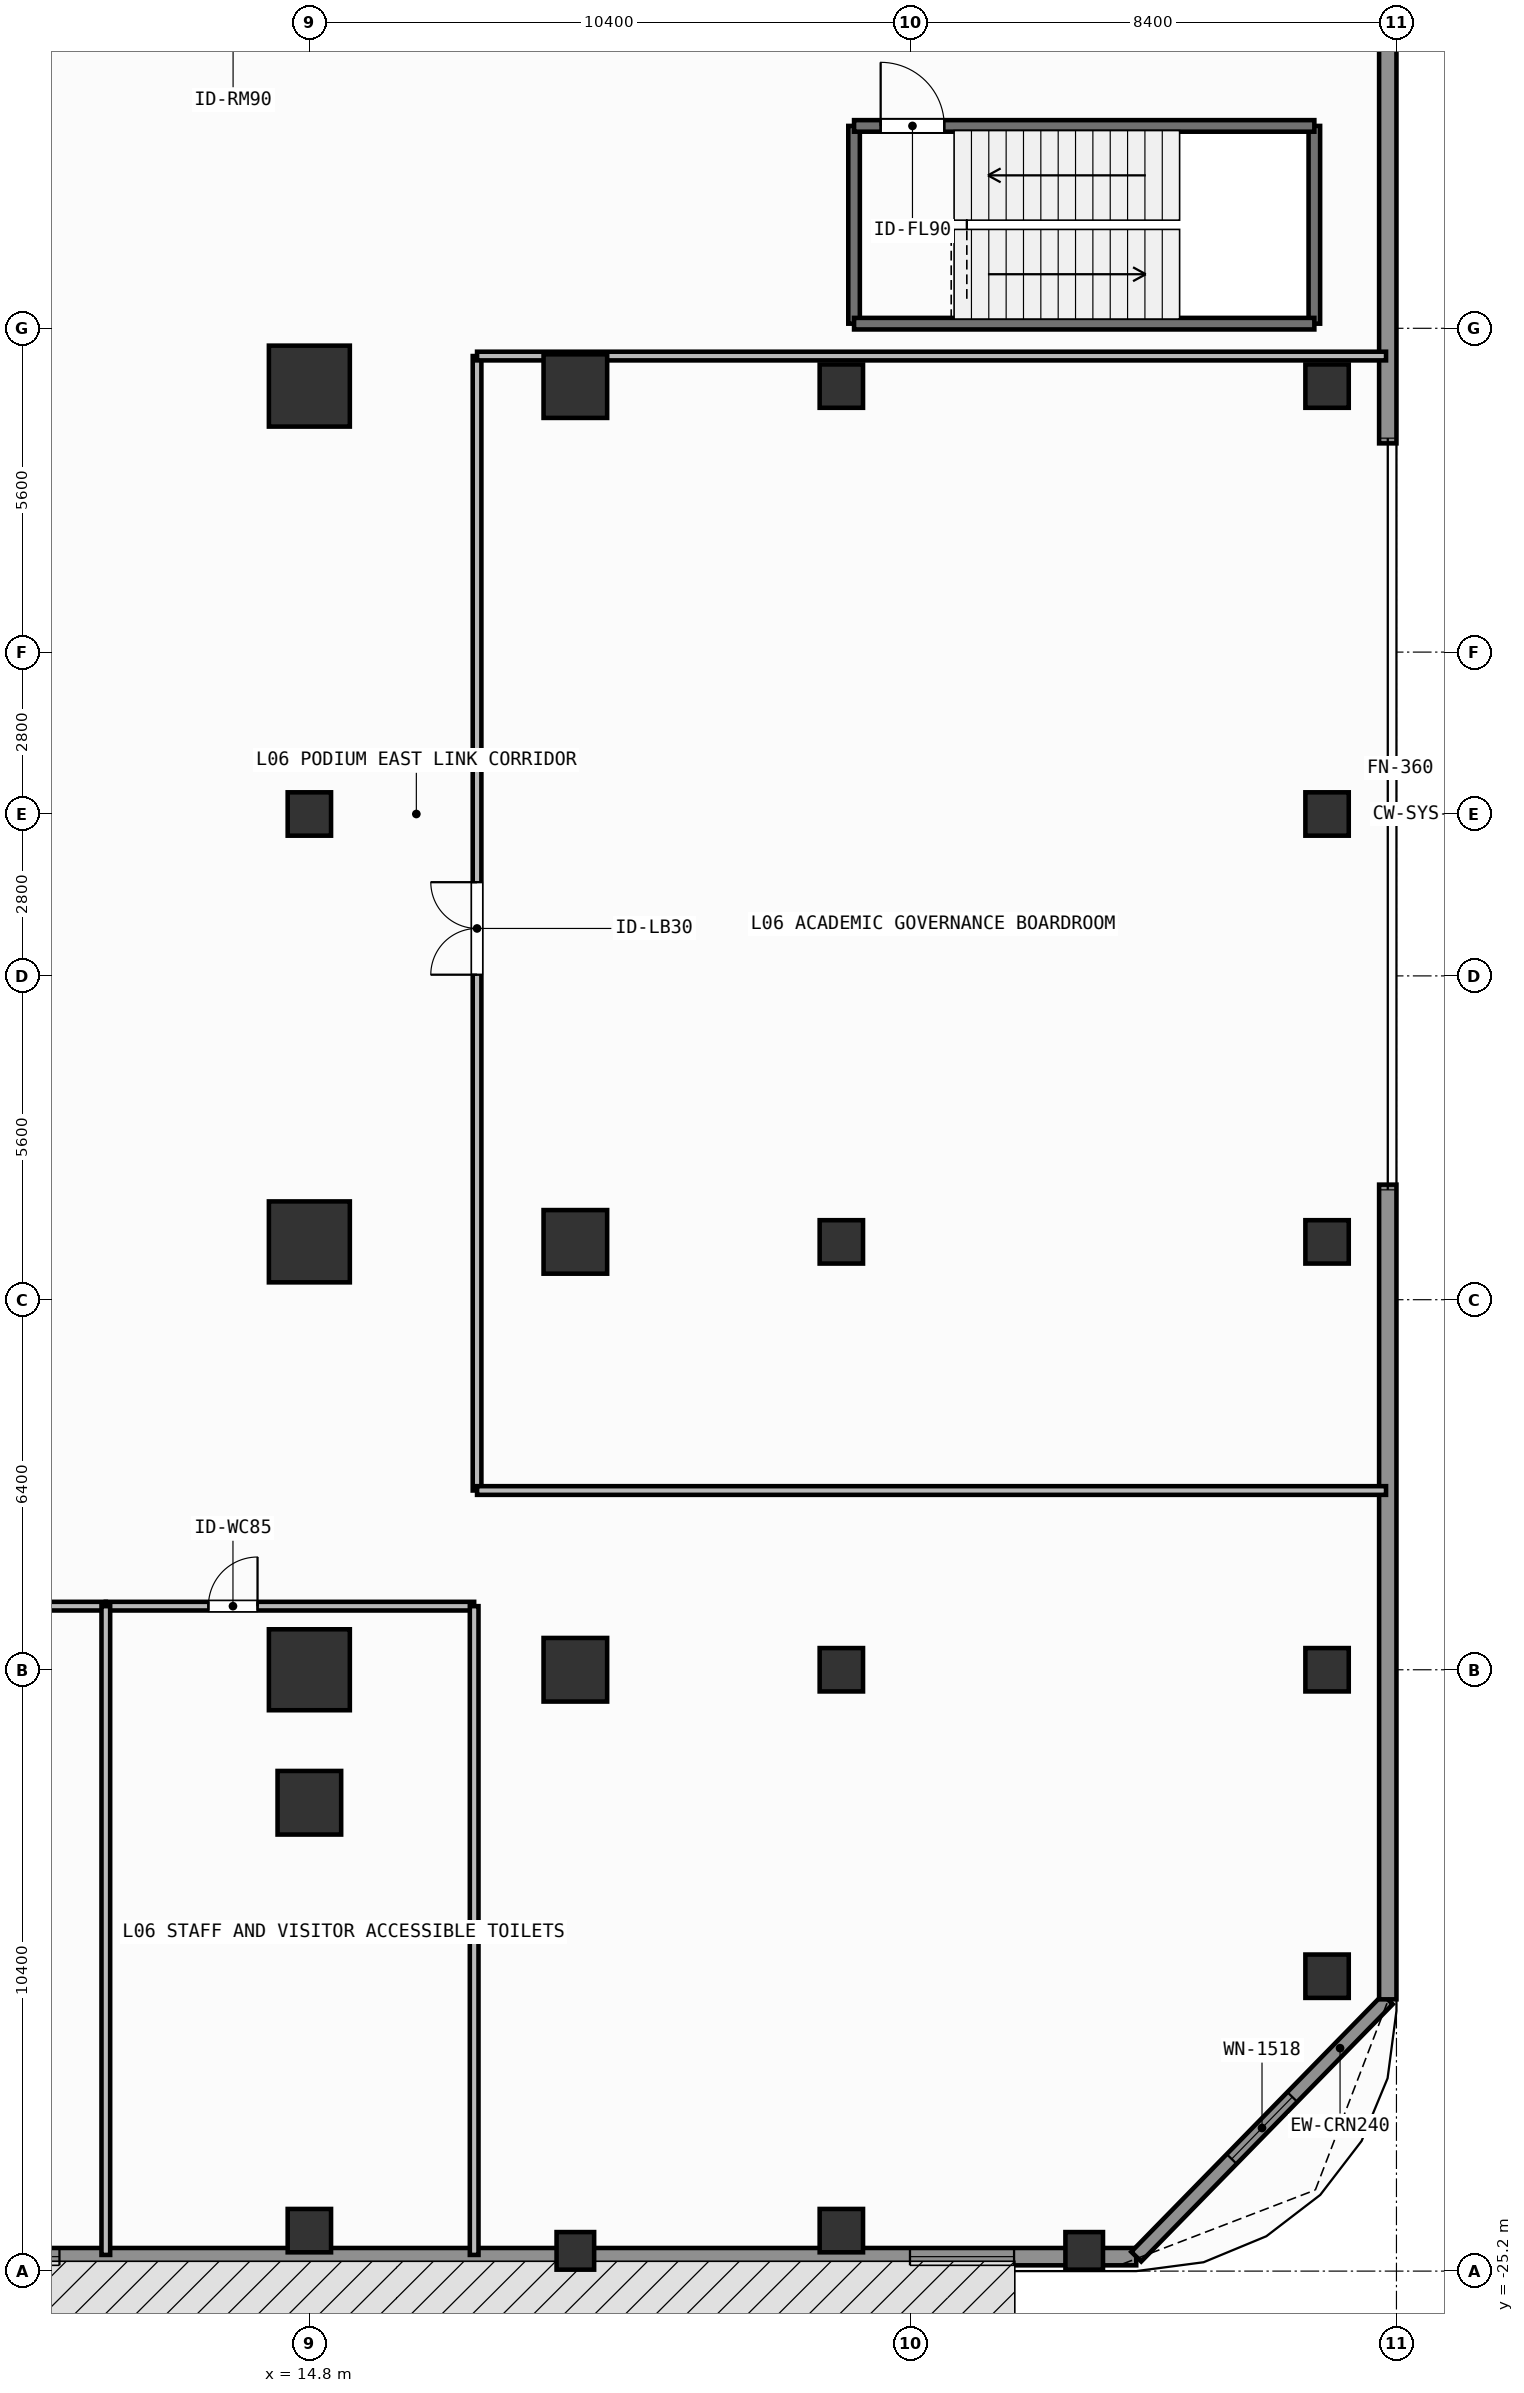
"""IFC4 building model, lengths in metres.
Left out: names, types, materials, properties, quantities, classifications, styles, units other than length and angle.
Written with IfcOpenShell. Run it as: python <this file> out.ifc"""

import sys

from ifc_helpers import new_model, si_unit, direction, frame, frame_2d, origin, origin_2d, place, context, subcontext, project, spatial, rectangle, extrude, element, fill, save


model = new_model("IFC4")
c1 = context("Model", 3, precision=1e-05, world=origin(), true_north=direction((0.0, 1.0)))
c2 = subcontext(c1, "Body", "Model", "MODEL_VIEW")
j1 = project(units=[si_unit("LENGTHUNIT", "METRE"), si_unit("PLANEANGLEUNIT", "RADIAN")], contexts=[c1])
p1 = place(None, origin())
s1 = spatial("IfcSite", under=j1, at=p1, CompositionType="ELEMENT")
p2 = place(p1, origin())
s2 = spatial("IfcBuilding", under=s1, at=p2, CompositionType="ELEMENT")
p3 = place(p2, frame((0.0, 0.0, 21.6)))
s3 = spatial("IfcBuildingStorey", under=s2, at=p3, CompositionType="ELEMENT", Elevation=21.6)
for number, where, z_axis, x_axis in (
    (1, (14.8, -14.8, 0.0), (0.0, 0.0, 1.0), (1.0, 0.0, 0.0)),
    (2, (14.8, -7.4, 0.0), (0.0, 0.0, 1.0), (1.0, 0.0, 0.0)),
    (3, (14.8, 7.4, 0.0), (0.0, 0.0, 1.0), (1.0, 0.0, 0.0)),
):
    element("IfcColumn", number, at=place(p3, frame(where, z_axis=z_axis, x_axis=x_axis)), inside=s3, PredefinedType="COLUMN", context=c2, shape_type="SweptSolid", body=[
        extrude(rectangle(XDim=1.4, YDim=1.4, at=origin_2d()), origin(), (0.0, 0.0, 1.0), 4.8),
    ])
for number, where, z_axis, x_axis in (
    (4, (19.4, -14.8, 0.0), (0.0, 0.0, 1.0), (1.0, 0.0, 0.0)),
    (5, (19.4, -7.4, 0.0), (0.0, 0.0, 1.0), (1.0, 0.0, 0.0)),
    (6, (19.4, 7.4, 0.0), (0.0, 0.0, 1.0), (1.0, 0.0, 0.0)),
    (7, (14.8, -17.1, 0.0), (0.0, 0.0, 1.0), (1.0, 0.0, 0.0)),
):
    element("IfcColumn", number, at=place(p3, frame(where, z_axis=z_axis, x_axis=x_axis)), inside=s3, PredefinedType="COLUMN", context=c2, shape_type="SweptSolid", body=[
        extrude(rectangle(XDim=1.1, YDim=1.1, at=origin_2d()), origin(), (0.0, 0.0, 1.0), 4.8),
    ])
for number, where, z_axis, x_axis in (
    (8, (14.8, -24.5, 0.0), (0.0, 0.0, 1.0), (1.0, 0.0, 0.0)),
    (9, (14.8, 0.0, 0.0), (0.0, 0.0, 1.0), (1.0, 0.0, 0.0)),
    (10, (24.0, -24.5, 0.0), (0.0, 0.0, 1.0), (1.0, 0.0, 0.0)),
    (11, (24.0, -14.8, 0.0), (0.0, 0.0, 1.0), (1.0, 0.0, 0.0)),
    (12, (24.0, -7.4, 0.0), (0.0, 0.0, 1.0), (1.0, 0.0, 0.0)),
    (13, (24.0, 7.4, 0.0), (0.0, 0.0, 1.0), (1.0, 0.0, 0.0)),
    (14, (32.4, -14.8, 0.0), (0.0, 0.0, 1.0), (1.0, 0.0, 0.0)),
    (15, (32.4, -7.4, 0.0), (0.0, 0.0, 1.0), (1.0, 0.0, 0.0)),
    (16, (32.4, 0.0, 0.0), (0.0, 0.0, 1.0), (1.0, 0.0, 0.0)),
    (17, (32.4, 7.4, 0.0), (0.0, 0.0, 1.0), (1.0, 0.0, 0.0)),
    (18, (32.4, -20.1, 0.0), (0.0, 0.0, 1.0), (1.0, 0.0, 0.0)),
):
    element("IfcColumn", number, at=place(p3, frame(where, z_axis=z_axis, x_axis=x_axis)), inside=s3, PredefinedType="COLUMN", context=c2, shape_type="SweptSolid", body=[
        extrude(rectangle(XDim=0.75, YDim=0.75, at=origin_2d()), origin(), (0.0, 0.0, 1.0), 4.8),
    ])
for number, where, z_axis, x_axis in (
    (19, (19.4, -24.85, 0.0), (0.0, 0.0, 1.0), (1.0, 0.0, 0.0)),
    (20, (28.2, -24.85, 0.0), (0.0, 0.0, 1.0), (1.0, 0.0, 0.0)),
):
    element("IfcColumn", number, at=place(p3, frame(where, z_axis=z_axis, x_axis=x_axis)), inside=s3, PredefinedType="PILASTER", context=c2, shape_type="SweptSolid", body=[
        extrude(rectangle(XDim=0.65, YDim=0.65, at=origin_2d()), origin(), (0.0, 0.0, 1.0), 4.8),
    ])
p4 = place(p3, frame((29.1, -24.95, 0.0), z_axis=(0.0, 0.0, 1.0), x_axis=(-1.0, 0.0, 0.0)))
e21 = element("IfcWall", 21, at=p4, inside=s3, PredefinedType="SOLIDWALL", context=c2, shape_type="SweptSolid", body=[
    extrude(rectangle(XDim=58.2, YDim=0.3, at=frame_2d((29.1, 0.0))), origin(), (0.0, 0.0, 1.0), 4.48),
])
p5 = place(p4, frame((54.287, 0.0, 0.85)))
e22 = element("IfcOpeningElement", 22, at=p5, cuts=e21, PredefinedType="OPENING", context=c2, shape_type="SweptSolid", body=[
    extrude(rectangle(XDim=1.8, YDim=2.0, at=frame_2d((0.9, 1.0))), frame((0.0, 0.16, 0.0), z_axis=(0.0, -1.0, 0.0), x_axis=(1.0, 0.0, 0.0)), (0.0, 0.0, 1.0), 0.32),
])
p6 = place(p4, frame((49.875, 0.0, 0.85)))
e23 = element("IfcOpeningElement", 23, at=p6, cuts=e21, PredefinedType="OPENING", context=c2, shape_type="SweptSolid", body=[
    extrude(rectangle(XDim=1.8, YDim=2.0, at=frame_2d((0.9, 1.0))), frame((0.0, 0.16, 0.0), z_axis=(0.0, -1.0, 0.0), x_axis=(1.0, 0.0, 0.0)), (0.0, 0.0, 1.0), 0.32),
])
p7 = place(p4, frame((39.3, 0.0, 0.85)))
e24 = element("IfcOpeningElement", 24, at=p7, cuts=e21, PredefinedType="OPENING", context=c2, shape_type="SweptSolid", body=[
    extrude(rectangle(XDim=1.8, YDim=2.0, at=frame_2d((0.9, 1.0))), frame((0.0, 0.16, 0.0), z_axis=(0.0, -1.0, 0.0), x_axis=(1.0, 0.0, 0.0)), (0.0, 0.0, 1.0), 0.32),
])
p8 = place(p4, frame((31.585, 0.0, 0.85)))
e25 = element("IfcOpeningElement", 25, at=p8, cuts=e21, PredefinedType="OPENING", context=c2, shape_type="SweptSolid", body=[
    extrude(rectangle(XDim=1.8, YDim=2.0, at=frame_2d((0.9, 1.0))), frame((0.0, 0.16, 0.0), z_axis=(0.0, -1.0, 0.0), x_axis=(1.0, 0.0, 0.0)), (0.0, 0.0, 1.0), 0.32),
])
p9 = place(p4, frame((24.512, 0.0, 0.85)))
e26 = element("IfcOpeningElement", 26, at=p9, cuts=e21, PredefinedType="OPENING", context=c2, shape_type="SweptSolid", body=[
    extrude(rectangle(XDim=1.8, YDim=2.0, at=frame_2d((0.9, 1.0))), frame((0.0, 0.16, 0.0), z_axis=(0.0, -1.0, 0.0), x_axis=(1.0, 0.0, 0.0)), (0.0, 0.0, 1.0), 0.32),
])
p10 = place(p4, frame((18.622, 0.0, 0.85)))
e27 = element("IfcOpeningElement", 27, at=p10, cuts=e21, PredefinedType="OPENING", context=c2, shape_type="SweptSolid", body=[
    extrude(rectangle(XDim=1.8, YDim=2.0, at=frame_2d((0.9, 1.0))), frame((0.0, 0.16, 0.0), z_axis=(0.0, -1.0, 0.0), x_axis=(1.0, 0.0, 0.0)), (0.0, 0.0, 1.0), 0.32),
])
p11 = place(p4, frame((2.113, 0.0, 0.85)))
e28 = element("IfcOpeningElement", 28, at=p11, cuts=e21, PredefinedType="OPENING", context=c2, shape_type="SweptSolid", body=[
    extrude(rectangle(XDim=1.8, YDim=2.0, at=frame_2d((0.9, 1.0))), frame((0.0, 0.16, 0.0), z_axis=(0.0, -1.0, 0.0), x_axis=(1.0, 0.0, 0.0)), (0.0, 0.0, 1.0), 0.32),
])
p12 = place(p3, frame((33.45, -20.5, 0.0), z_axis=(0.0, 0.0, 1.0), x_axis=(-0.69901822973, -0.715103848756, 0.0)))
e29 = element("IfcWall", 29, at=p12, inside=s3, PredefinedType="SOLIDWALL", context=c2, shape_type="SweptSolid", body=[
    extrude(rectangle(XDim=6.223, YDim=0.24, at=frame_2d((3.111, 0.0))), origin(), (0.0, 0.0, 1.0), 4.48),
])
p13 = place(p12, frame((2.362, 0.0, 0.85)))
e30 = element("IfcOpeningElement", 30, at=p13, cuts=e29, PredefinedType="OPENING", context=c2, shape_type="SweptSolid", body=[
    extrude(rectangle(XDim=1.5, YDim=1.85, at=frame_2d((0.75, 0.925))), frame((0.0, 0.13, 0.0), z_axis=(0.0, -1.0, 0.0), x_axis=(1.0, 0.0, 0.0)), (0.0, 0.0, 1.0), 0.26),
])
for number, where, z_axis, x_axis in (
    (31, (33.45, -20.5, 0.0), (0.0, 0.0, 1.0), (0.0, 1.0, 0.0)),
    (32, (33.45, 6.41, 0.0), (0.0, 0.0, 1.0), (0.0, 1.0, 0.0)),
):
    element("IfcWall", number, at=place(p3, frame(where, z_axis=z_axis, x_axis=x_axis)), inside=s3, PredefinedType="SOLIDWALL", context=c2, shape_type="SweptSolid", body=[
        extrude(rectangle(XDim=14.09, YDim=0.3, at=frame_2d((7.045, 0.0))), origin(), (0.0, 0.0, 1.0), 4.48),
    ])
for number, where, z_axis, x_axis in (
    (33, (24.22, 8.48, 0.0), (0.0, 0.0, 1.0), (0.0, 1.0, 0.0)),
    (34, (32.18, 11.9, 0.0), (0.0, 0.0, 1.0), (0.0, -1.0, 0.0)),
):
    element("IfcWall", number, at=place(p3, frame(where, z_axis=z_axis, x_axis=x_axis)), inside=s3, PredefinedType="SHEAR", context=c2, shape_type="SweptSolid", body=[
        extrude(rectangle(XDim=3.42, YDim=0.2, at=frame_2d((1.71, 0.0))), origin(), (0.0, 0.0, 1.0), 4.48),
    ])
p14 = place(p3, frame((32.18, 8.48, 0.0), z_axis=(0.0, 0.0, 1.0), x_axis=(-1.0, 0.0, 0.0)))
e35 = element("IfcWall", 35, at=p14, inside=s3, PredefinedType="SHEAR", context=c2, shape_type="SweptSolid", body=[
    extrude(rectangle(XDim=7.96, YDim=0.2, at=frame_2d((3.98, 0.0))), origin(), (0.0, 0.0, 1.0), 4.48),
])
p15 = place(p3, frame((24.22, 11.9, 0.0), z_axis=(0.0, 0.0, 1.0), x_axis=(1.0, 0.0, 0.0)))
e36 = element("IfcWall", 36, at=p15, inside=s3, PredefinedType="SHEAR", context=c2, shape_type="SweptSolid", body=[
    extrude(rectangle(XDim=7.96, YDim=0.2, at=frame_2d((3.98, 0.0))), origin(), (0.0, 0.0, 1.0), 4.48),
])
p16 = place(p15, frame((0.46, 0.0, 0.0)))
e37 = element("IfcOpeningElement", 37, at=p16, cuts=e36, PredefinedType="OPENING", context=c2, shape_type="SweptSolid", body=[
    extrude(rectangle(XDim=1.1, YDim=2.15, at=frame_2d((0.55, 1.075))), frame((0.0, 0.11, 0.0), z_axis=(0.0, -1.0, 0.0), x_axis=(1.0, 0.0, 0.0)), (0.0, 0.0, 1.0), 0.22),
])
p17 = place(p3, frame((17.7, -11.7, 0.0), z_axis=(0.0, 0.0, 1.0), x_axis=(0.0, 1.0, 0.0)))
e38 = element("IfcWall", 38, at=p17, inside=s3, PredefinedType="PARTITIONING", context=c2, shape_type="SweptSolid", body=[
    extrude(rectangle(XDim=19.62, YDim=0.15, at=frame_2d((9.81, 0.0))), origin(), (0.0, 0.0, 1.0), 4.48),
])
p18 = place(p17, frame((8.921, 0.0, 0.0)))
e39 = element("IfcOpeningElement", 39, at=p18, cuts=e38, PredefinedType="OPENING", context=c2, shape_type="SweptSolid", body=[
    extrude(rectangle(XDim=1.6, YDim=2.3, at=frame_2d((0.8, 1.15))), frame((0.0, 0.085, 0.0), z_axis=(0.0, -1.0, 0.0), x_axis=(1.0, 0.0, 0.0)), (0.0, 0.0, 1.0), 0.17),
])
p19 = place(p3, frame((-6.32, -13.7, 0.0), z_axis=(0.0, 0.0, 1.0), x_axis=(1.0, 0.0, 0.0)))
e40 = element("IfcWall", 40, at=p19, inside=s3, PredefinedType="PARTITIONING", context=c2, shape_type="SweptSolid", body=[
    extrude(rectangle(XDim=17.6, YDim=0.15, at=frame_2d((8.8, 0.0))), origin(), (0.0, 0.0, 1.0), 4.48),
])
p20 = place(p19, frame((8.35, 0.0, 0.0)))
e41 = element("IfcOpeningElement", 41, at=p20, cuts=e40, PredefinedType="OPENING", context=c2, shape_type="SweptSolid", body=[
    extrude(rectangle(XDim=0.9, YDim=2.1, at=frame_2d((0.45, 1.05))), frame((0.0, 0.085, 0.0), z_axis=(0.0, -1.0, 0.0), x_axis=(1.0, 0.0, 0.0)), (0.0, 0.0, 1.0), 0.17),
])
p21 = place(p3, frame((11.28, -13.7, 0.0), z_axis=(0.0, 0.0, 1.0), x_axis=(1.0, 0.0, 0.0)))
e42 = element("IfcWall", 42, at=p21, inside=s3, PredefinedType="PARTITIONING", context=c2, shape_type="SweptSolid", body=[
    extrude(rectangle(XDim=6.37, YDim=0.15, at=frame_2d((3.185, 0.0))), origin(), (0.0, 0.0, 1.0), 4.48),
])
p22 = place(p21, frame((1.774, 0.0, 0.0)))
e43 = element("IfcOpeningElement", 43, at=p22, cuts=e42, PredefinedType="OPENING", context=c2, shape_type="SweptSolid", body=[
    extrude(rectangle(XDim=0.85, YDim=2.1, at=frame_2d((0.425, 1.05))), frame((0.0, 0.085, 0.0), z_axis=(0.0, -1.0, 0.0), x_axis=(1.0, 0.0, 0.0)), (0.0, 0.0, 1.0), 0.17),
])
for number, where, z_axis, x_axis in (
    (44, (17.7, -11.7, 0.0), (0.0, 0.0, 1.0), (1.0, 0.0, 0.0)),
    (45, (17.7, 7.92, 0.0), (0.0, 0.0, 1.0), (1.0, 0.0, 0.0)),
):
    element("IfcWall", number, at=place(p3, frame(where, z_axis=z_axis, x_axis=x_axis)), inside=s3, PredefinedType="PARTITIONING", context=c2, shape_type="SweptSolid", body=[
        extrude(rectangle(XDim=15.72, YDim=0.15, at=frame_2d((7.86, 0.0))), origin(), (0.0, 0.0, 1.0), 4.48),
    ])
p23 = place(p3, frame((11.28, -24.92, 0.0), z_axis=(0.0, 0.0, 1.0), x_axis=(0.0, 1.0, 0.0)))
e46 = element("IfcWall", 46, at=p23, inside=s3, PredefinedType="PARTITIONING", context=c2, shape_type="SweptSolid", body=[
    extrude(rectangle(XDim=11.22, YDim=0.15, at=frame_2d((5.61, 0.0))), origin(), (0.0, 0.0, 1.0), 4.17),
])
p24 = place(p3, frame((17.65, -24.92, 0.0), z_axis=(0.0, 0.0, 1.0), x_axis=(0.0, 1.0, 0.0)))
e47 = element("IfcWall", 47, at=p24, inside=s3, PredefinedType="PARTITIONING", context=c2, shape_type="SweptSolid", body=[
    extrude(rectangle(XDim=11.22, YDim=0.15, at=frame_2d((5.61, 0.0))), origin(), (0.0, 0.0, 1.0), 4.48),
])
p25 = place(p13, origin())
e48 = element("IfcWindow", 48, at=p25, inside=s3, PartitioningType="SINGLE_PANEL", PredefinedType="WINDOW", context=c2, shape_type="SweptSolid", body=[
    extrude(rectangle(XDim=1.5, YDim=1.85, at=frame_2d((0.75, 0.925))), frame((0.0, 0.03, 0.0), z_axis=(0.0, -1.0, 0.0), x_axis=(1.0, 0.0, 0.0)), (0.0, 0.0, 1.0), 0.06),
])
fill(e30, e48)
p26 = place(p10, origin())
e49 = element("IfcWindow", 49, at=p26, inside=s3, PartitioningType="SINGLE_PANEL", PredefinedType="WINDOW", context=c2, shape_type="SweptSolid", body=[
    extrude(rectangle(XDim=1.8, YDim=2.0, at=frame_2d((0.9, 1.0))), frame((0.0, 0.03, 0.0), z_axis=(0.0, -1.0, 0.0), x_axis=(1.0, 0.0, 0.0)), (0.0, 0.0, 1.0), 0.06),
])
fill(e27, e49)
p27 = place(p11, origin())
e50 = element("IfcWindow", 50, at=p27, inside=s3, PartitioningType="SINGLE_PANEL", PredefinedType="WINDOW", context=c2, shape_type="SweptSolid", body=[
    extrude(rectangle(XDim=1.8, YDim=2.0, at=frame_2d((0.9, 1.0))), frame((0.0, 0.03, 0.0), z_axis=(0.0, -1.0, 0.0), x_axis=(1.0, 0.0, 0.0)), (0.0, 0.0, 1.0), 0.06),
])
fill(e28, e50)
p28 = place(p16, origin())
e51 = element("IfcDoor", 51, at=p28, inside=s3, OperationType="SINGLE_SWING_LEFT", PredefinedType="DOOR", context=c2, shape_type="SweptSolid", body=[
    extrude(rectangle(XDim=1.1, YDim=2.15, at=frame_2d((0.55, 1.075))), frame((0.0, 0.025, 0.0), z_axis=(0.0, -1.0, 0.0), x_axis=(1.0, 0.0, 0.0)), (0.0, 0.0, 1.0), 0.05),
])
fill(e37, e51)
p29 = place(p18, origin())
e52 = element("IfcDoor", 52, at=p29, inside=s3, OperationType="SINGLE_SWING_LEFT", PredefinedType="DOOR", context=c2, shape_type="SweptSolid", body=[
    extrude(rectangle(XDim=1.6, YDim=2.3, at=frame_2d((0.8, 1.15))), frame((0.0, 0.025, 0.0), z_axis=(0.0, -1.0, 0.0), x_axis=(1.0, 0.0, 0.0)), (0.0, 0.0, 1.0), 0.05),
])
fill(e39, e52)
p30 = place(p22, origin())
e53 = element("IfcDoor", 53, at=p30, inside=s3, OperationType="SINGLE_SWING_RIGHT", PredefinedType="DOOR", context=c2, shape_type="SweptSolid", body=[
    extrude(rectangle(XDim=0.85, YDim=2.1, at=frame_2d((0.425, 1.05))), frame((0.0, 0.025, 0.0), z_axis=(0.0, -1.0, 0.0), x_axis=(1.0, 0.0, 0.0)), (0.0, 0.0, 1.0), 0.05),
])
fill(e43, e53)
save(model, sys.argv[1])
